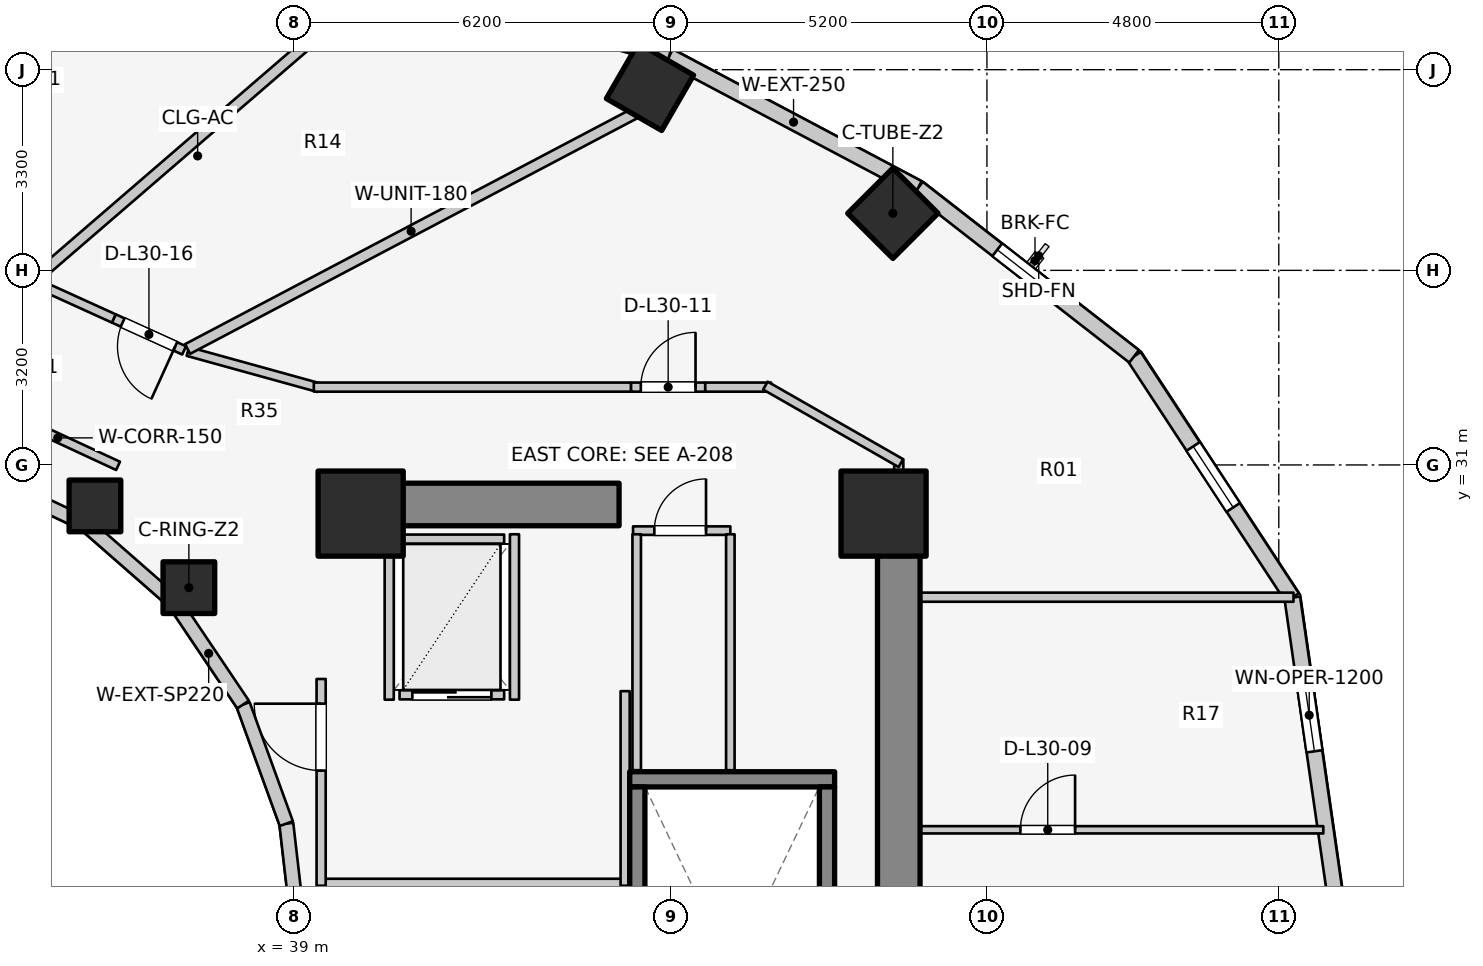
"""IFC4 building model, lengths in metres.
Left out: names, types, materials, properties, quantities, classifications, styles, units other than length and angle.
Written with IfcOpenShell. Run it as: python <this file> out.ifc"""

import sys

from ifc_helpers import new_model, si_unit, direction, frame, frame_2d, origin, origin_2d, place, context, subcontext, project, spatial, rectangle, extrude, element, fill, save


model = new_model("IFC4")
c1 = context("Model", 3, precision=1e-05, world=origin(), true_north=direction((0.0, 1.0)))
c2 = subcontext(c1, "Body", "Model", "MODEL_VIEW")
j1 = project(units=[si_unit("LENGTHUNIT", "METRE"), si_unit("PLANEANGLEUNIT", "RADIAN")], contexts=[c1])
p1 = place(None, origin())
s1 = spatial("IfcSite", under=j1, at=p1, CompositionType="ELEMENT")
p2 = place(p1, origin())
s2 = spatial("IfcBuilding", under=s1, at=p2, CompositionType="ELEMENT")
p3 = place(p2, frame((0.0, 0.0, 101.1)))
s3 = spatial("IfcBuildingStorey", under=s2, at=p3, CompositionType="ELEMENT", Elevation=101.1)
p4 = place(p3, frame((48.95, 17.05, 0.0), z_axis=(0.0, 0.0, 1.0), x_axis=(0.0, 1.0, 0.0)))
e1 = element("IfcWall", 1, at=p4, inside=s3, PredefinedType="SHEAR", context=c2, shape_type="SweptSolid", body=[
    extrude(rectangle(XDim=12.8, YDim=0.7, at=frame_2d((6.4, 0.0))), origin(), (0.0, 0.0, 1.0), 3.1),
])
p5 = place(p3, frame((39.85, 30.35, 0.0), z_axis=(0.0, 0.0, 1.0), x_axis=(1.0, 0.0, 0.0)))
e2 = element("IfcWall", 2, at=p5, inside=s3, PredefinedType="SHEAR", context=c2, shape_type="SweptSolid", body=[
    extrude(rectangle(XDim=4.5, YDim=0.7, at=frame_2d((2.25, 0.0))), origin(), (0.0, 0.0, 1.0), 3.1),
])
p6 = place(p3, frame((44.525, 25.83, 0.0), z_axis=(0.0, 0.0, 1.0), x_axis=(1.0, 0.0, 0.0)))
e3 = element("IfcWall", 3, at=p6, inside=s3, PredefinedType="SOLIDWALL", context=c2, shape_type="SweptSolid", body=[
    extrude(rectangle(XDim=3.37, YDim=0.25, at=frame_2d((1.685, 0.0))), origin(), (0.0, 0.0, 1.0), 3.1),
])
for number, where, z_axis, x_axis in (
    (4, (44.65, 17.895, 0.0), (0.0, 0.0, 1.0), (0.0, 1.0, 0.0)),
    (5, (47.77, 17.895, 0.0), (0.0, 0.0, 1.0), (0.0, 1.0, 0.0)),
):
    element("IfcWall", number, at=place(p3, frame(where, z_axis=z_axis, x_axis=x_axis)), inside=s3, PredefinedType="SOLIDWALL", context=c2, shape_type="SweptSolid", body=[
        extrude(rectangle(XDim=7.81, YDim=0.25, at=frame_2d((3.905, 0.0))), origin(), (0.0, 0.0, 1.0), 3.1),
    ])
for number, where, z_axis, x_axis in (
    (6, (48.7, 30.2, 0.0), (0.0, 0.0, 1.0), (1.0, 0.0, 0.0)),
    (7, (40.1, 30.2, 0.0), (0.0, 0.0, 1.0), (1.0, 0.0, 0.0)),
):
    element("IfcColumn", number, at=place(p3, frame(where, z_axis=z_axis, x_axis=x_axis)), inside=s3, PredefinedType="COLUMN", context=c2, shape_type="SweptSolid", body=[
        extrude(rectangle(XDim=1.4, YDim=1.4, at=origin_2d()), origin(), (0.0, 0.0, 1.0), 3.1),
    ])
p7 = place(p3, frame((37.275, 28.982, 0.0), z_axis=(0.0, 0.0, 1.0), x_axis=(1.0, 0.0, 0.0)))
e8 = element("IfcColumn", 8, at=p7, inside=s3, PredefinedType="COLUMN", context=c2, shape_type="SweptSolid", body=[
    extrude(rectangle(XDim=0.85, YDim=0.85, at=origin_2d()), origin(), (0.0, 0.0, 1.0), 3.1),
])
p8 = place(p3, frame((48.853, 35.138, 0.0), z_axis=(0.0, 0.0, 1.0), x_axis=(0.707106781187, 0.707106781187, 0.0)))
e9 = element("IfcColumn", 9, at=p8, inside=s3, PredefinedType="COLUMN", context=c2, shape_type="SweptSolid", body=[
    extrude(rectangle(XDim=1.05, YDim=1.05, at=origin_2d()), origin(), (0.0, 0.0, 1.0), 3.1),
])
p9 = place(p3, frame((35.73, 30.327, 0.0), z_axis=(0.0, 0.0, 1.0), x_axis=(1.0, 0.0, 0.0)))
e10 = element("IfcColumn", 10, at=p9, inside=s3, PredefinedType="COLUMN", context=c2, shape_type="SweptSolid", body=[
    extrude(rectangle(XDim=0.85, YDim=0.85, at=origin_2d()), origin(), (0.0, 0.0, 1.0), 3.1),
])
p10 = place(p3, frame((44.858, 37.218, 0.0), z_axis=(0.0, 0.0, 1.0), x_axis=(0.5, 0.866025403784, 0.0)))
e11 = element("IfcColumn", 11, at=p10, inside=s3, PredefinedType="COLUMN", context=c2, shape_type="SweptSolid", body=[
    extrude(rectangle(XDim=1.05, YDim=1.05, at=origin_2d()), origin(), (0.0, 0.0, 1.0), 3.1),
])
p11 = place(p3, frame((39.12, 23.0, 0.0), z_axis=(0.0, 0.0, 1.0), x_axis=(-0.114711713601, 0.993398823617, 0.0)))
e12 = element("IfcWall", 12, at=p11, inside=s3, PredefinedType="STANDARD", context=c2, shape_type="SweptSolid", body=[
    extrude(rectangle(XDim=2.115, YDim=0.23, at=frame_2d((1.058, 0.0))), origin(), (0.0, 0.0, 1.0), 2.56),
])
p12 = place(p3, frame((38.877, 25.102, 0.0), z_axis=(0.0, 0.0, 1.0), x_axis=(-0.341423187295, 0.93990968033, 0.0)))
e13 = element("IfcWall", 13, at=p12, inside=s3, PredefinedType="STANDARD", context=c2, shape_type="SweptSolid", body=[
    extrude(rectangle(XDim=2.084, YDim=0.23, at=frame_2d((1.042, 0.0))), origin(), (0.0, 0.0, 1.0), 2.56),
])
p13 = place(p3, frame((38.166, 27.06, 0.0), z_axis=(0.0, 0.0, 1.0), x_axis=(-0.558197800898, 0.829707909492, 0.0)))
e14 = element("IfcWall", 14, at=p13, inside=s3, PredefinedType="STANDARD", context=c2, shape_type="SweptSolid", body=[
    extrude(rectangle(XDim=2.027, YDim=0.23, at=frame_2d((1.013, 0.0))), origin(), (0.0, 0.0, 1.0), 1.22),
])
p14 = place(p3, frame((37.035, 28.742, 0.0), z_axis=(0.0, 0.0, 1.0), x_axis=(-0.752576694707, 0.658504607869, 0.0)))
e15 = element("IfcWall", 15, at=p14, inside=s3, PredefinedType="STANDARD", context=c2, shape_type="SweptSolid", body=[
    extrude(rectangle(XDim=1.959, YDim=0.23, at=frame_2d((0.98, 0.0))), origin(), (0.0, 0.0, 1.0), 1.22),
])
p15 = place(p3, frame((35.56, 30.032, 0.0), z_axis=(0.0, 0.0, 1.0), x_axis=(-0.904179699603, 0.427152280606, 0.0)))
e16 = element("IfcWall", 16, at=p15, inside=s3, PredefinedType="STANDARD", context=c2, shape_type="SweptSolid", body=[
    extrude(rectangle(XDim=1.899, YDim=0.23, at=frame_2d((0.95, 0.0))), origin(), (0.0, 0.0, 1.0), 1.22),
])
p16 = place(p3, frame((56.26, 23.0, 0.0), z_axis=(0.0, 0.0, 1.0), x_axis=(-0.142572472068, 0.98978436551, 0.0)))
e17 = element("IfcWall", 17, at=p16, inside=s3, PredefinedType="STANDARD", context=c2, shape_type="SweptSolid", body=[
    extrude(rectangle(XDim=5.879, YDim=0.26, at=frame_2d((2.939, 0.0))), origin(), (0.0, 0.0, 1.0), 2.57),
])
p17 = place(p16, frame((3.325, 0.0, 0.75)))
e18 = element("IfcOpeningElement", 18, at=p17, cuts=e17, PredefinedType="OPENING", context=c2, shape_type="SweptSolid", body=[
    extrude(rectangle(XDim=1.2, YDim=1.5, at=frame_2d((0.6, 0.75))), frame((0.0, 0.14, 0.0), z_axis=(0.0, -1.0, 0.0), x_axis=(1.0, 0.0, 0.0)), (0.0, 0.0, 1.0), 0.28),
])
p18 = place(p3, frame((55.422, 28.819, 0.0), z_axis=(0.0, 0.0, 1.0), x_axis=(-0.548283220945, 0.836292717672, 0.0)))
e19 = element("IfcWall", 19, at=p18, inside=s3, PredefinedType="STANDARD", context=c2, shape_type="SweptSolid", body=[
    extrude(rectangle(XDim=4.744, YDim=0.26, at=frame_2d((2.372, 0.0))), origin(), (0.0, 0.0, 1.0), 1.22),
])
p19 = place(p18, frame((1.772, 0.0, 0.15)))
e20 = element("IfcOpeningElement", 20, at=p19, cuts=e19, PredefinedType="OPENING", context=c2, shape_type="SweptSolid", body=[
    extrude(rectangle(XDim=1.2, YDim=0.9, at=frame_2d((0.6, 0.45))), frame((0.0, 0.14, 0.0), z_axis=(0.0, -1.0, 0.0), x_axis=(1.0, 0.0, 0.0)), (0.0, 0.0, 1.0), 0.28),
])
p20 = place(p3, frame((52.821, 32.786, 0.0), z_axis=(0.0, 0.0, 1.0), x_axis=(-0.789127449954, 0.614229491094, 0.0)))
e21 = element("IfcWall", 21, at=p20, inside=s3, PredefinedType="STANDARD", context=c2, shape_type="SweptSolid", body=[
    extrude(rectangle(XDim=4.505, YDim=0.26, at=frame_2d((2.252, 0.0))), origin(), (0.0, 0.0, 1.0), 1.22),
])
p21 = place(p20, frame((1.652, 0.0, 0.15)))
e22 = element("IfcOpeningElement", 22, at=p21, cuts=e21, PredefinedType="OPENING", context=c2, shape_type="SweptSolid", body=[
    extrude(rectangle(XDim=1.2, YDim=0.9, at=frame_2d((0.6, 0.45))), frame((0.0, 0.14, 0.0), z_axis=(0.0, -1.0, 0.0), x_axis=(1.0, 0.0, 0.0)), (0.0, 0.0, 1.0), 0.28),
])
p22 = place(p3, frame((49.266, 35.553, 0.0), z_axis=(0.0, 0.0, 1.0), x_axis=(-0.883668636807, 0.4681129568, 0.0)))
e23 = element("IfcWall", 23, at=p22, inside=s3, PredefinedType="STANDARD", context=c2, shape_type="SweptSolid", body=[
    extrude(rectangle(XDim=4.631, YDim=0.26, at=frame_2d((2.316, 0.0))), origin(), (0.0, 0.0, 1.0), 1.22),
])
p23 = place(p3, frame((45.173, 37.721, 0.0), z_axis=(0.0, 0.0, 1.0), x_axis=(-0.962938491413, 0.269721081407, 0.0)))
e24 = element("IfcWall", 24, at=p23, inside=s3, PredefinedType="STANDARD", context=c2, shape_type="SweptSolid", body=[
    extrude(rectangle(XDim=5.563, YDim=0.26, at=frame_2d((2.782, 0.0))), origin(), (0.0, 0.0, 1.0), 1.22),
])
p24 = place(p23, frame((2.182, 0.0, 0.15)))
e25 = element("IfcOpeningElement", 25, at=p24, cuts=e24, PredefinedType="OPENING", context=c2, shape_type="SweptSolid", body=[
    extrude(rectangle(XDim=1.2, YDim=0.9, at=frame_2d((0.6, 0.45))), frame((0.0, 0.14, 0.0), z_axis=(0.0, -1.0, 0.0), x_axis=(1.0, 0.0, 0.0)), (0.0, 0.0, 1.0), 0.28),
])
p25 = place(p3, frame((40.74, 27.22, 0.0), z_axis=(0.0, 0.0, 1.0), x_axis=(1.0, 0.0, 0.0)))
e26 = element("IfcWall", 26, at=p25, inside=s3, PredefinedType="SOLIDWALL", context=c2, shape_type="SweptSolid", body=[
    extrude(rectangle(XDim=1.72, YDim=0.15, at=frame_2d((0.86, 0.0))), origin(), (0.0, 0.0, 1.0), 2.575),
])
p26 = place(p25, frame((0.21, 0.0, 0.0)))
e27 = element("IfcOpeningElement", 27, at=p26, cuts=e26, PredefinedType="OPENING", context=c2, shape_type="SweptSolid", body=[
    extrude(rectangle(XDim=1.3, YDim=2.1, at=frame_2d((0.65, 1.05))), frame((0.0, 0.085, 0.0), z_axis=(0.0, -1.0, 0.0), x_axis=(1.0, 0.0, 0.0)), (0.0, 0.0, 1.0), 0.17),
])
p27 = place(p3, frame((40.74, 29.78, 0.0), z_axis=(0.0, 0.0, 1.0), x_axis=(1.0, 0.0, 0.0)))
e28 = element("IfcWall", 28, at=p27, inside=s3, PredefinedType="SOLIDWALL", context=c2, shape_type="SweptSolid", body=[
    extrude(rectangle(XDim=1.72, YDim=0.15, at=frame_2d((0.86, 0.0))), origin(), (0.0, 0.0, 1.0), 2.575),
])
for number, where, z_axis, x_axis in (
    (29, (40.57, 27.14, 0.0), (0.0, 0.0, 1.0), (0.0, 1.0, 0.0)),
    (30, (42.63, 27.14, 0.0), (0.0, 0.0, 1.0), (0.0, 1.0, 0.0)),
):
    element("IfcWall", number, at=place(p3, frame(where, z_axis=z_axis, x_axis=x_axis)), inside=s3, PredefinedType="SOLIDWALL", context=c2, shape_type="SweptSolid", body=[
        extrude(rectangle(XDim=2.72, YDim=0.15, at=frame_2d((1.36, 0.0))), origin(), (0.0, 0.0, 1.0), 2.575),
    ])
p28 = place(p3, frame((39.4, 24.12, 0.0), z_axis=(0.0, 0.0, 1.0), x_axis=(1.0, 0.0, 0.0)))
e31 = element("IfcWall", 31, at=p28, inside=s3, PredefinedType="PARTITIONING", context=c2, shape_type="SweptSolid", body=[
    extrude(rectangle(XDim=5.08, YDim=0.15, at=frame_2d((2.54, 0.0))), origin(), (0.0, 0.0, 1.0), 2.12),
])
p29 = place(p3, frame((44.45, 24.08, 0.0), z_axis=(0.0, 0.0, 1.0), x_axis=(0.0, 1.0, 0.0)))
e32 = element("IfcWall", 32, at=p29, inside=s3, PredefinedType="PARTITIONING", context=c2, shape_type="SweptSolid", body=[
    extrude(rectangle(XDim=3.2, YDim=0.15, at=frame_2d((1.6, 0.0))), origin(), (0.0, 0.0, 1.0), 2.575),
])
p30 = place(p3, frame((39.45, 24.08, 0.0), z_axis=(0.0, 0.0, 1.0), x_axis=(0.0, 1.0, 0.0)))
e33 = element("IfcWall", 33, at=p30, inside=s3, PredefinedType="PARTITIONING", context=c2, shape_type="SweptSolid", body=[
    extrude(rectangle(XDim=3.4, YDim=0.15, at=frame_2d((1.7, 0.0))), origin(), (0.0, 0.0, 1.0), 2.575),
])
p31 = place(p30, frame((1.894, 0.0, 0.0)))
e34 = element("IfcOpeningElement", 34, at=p31, cuts=e33, PredefinedType="OPENING", context=c2, shape_type="SweptSolid", body=[
    extrude(rectangle(XDim=1.1, YDim=2.1, at=frame_2d((0.55, 1.05))), frame((0.0, 0.085, 0.0), z_axis=(0.0, -1.0, 0.0), x_axis=(1.0, 0.0, 0.0)), (0.0, 0.0, 1.0), 0.17),
])
p32 = place(p3, frame((44.58, 29.92, 0.0), z_axis=(0.0, 0.0, 1.0), x_axis=(1.0, 0.0, 0.0)))
e35 = element("IfcWall", 35, at=p32, inside=s3, PredefinedType="PLUMBINGWALL", context=c2, shape_type="SweptSolid", body=[
    extrude(rectangle(XDim=1.6, YDim=0.14, at=frame_2d((0.8, 0.0))), origin(), (0.0, 0.0, 1.0), 2.575),
])
p33 = place(p32, frame((0.35, 0.0, 0.0)))
e36 = element("IfcOpeningElement", 36, at=p33, cuts=e35, PredefinedType="OPENING", context=c2, shape_type="SweptSolid", body=[
    extrude(rectangle(XDim=0.85, YDim=2.05, at=frame_2d((0.425, 1.025))), frame((0.0, 0.08, 0.0), z_axis=(0.0, -1.0, 0.0), x_axis=(1.0, 0.0, 0.0)), (0.0, 0.0, 1.0), 0.16),
])
for number, where, z_axis, x_axis in (
    (37, (44.64, 25.98, 0.0), (0.0, 0.0, 1.0), (0.0, 1.0, 0.0)),
    (38, (46.18, 25.98, 0.0), (0.0, 0.0, 1.0), (0.0, 1.0, 0.0)),
):
    element("IfcWall", number, at=place(p3, frame(where, z_axis=z_axis, x_axis=x_axis)), inside=s3, PredefinedType="PLUMBINGWALL", context=c2, shape_type="SweptSolid", body=[
        extrude(rectangle(XDim=3.88, YDim=0.14, at=frame_2d((1.94, 0.0))), origin(), (0.0, 0.0, 1.0), 2.575),
    ])
p34 = place(p3, frame((36.11, 30.985, 0.0), z_axis=(0.0, 0.0, 1.0), x_axis=(-0.906943449489, 0.421252393975, 0.0)))
e39 = element("IfcWall", 39, at=p34, inside=s3, PredefinedType="PARTITIONING", context=c2, shape_type="SweptSolid", body=[
    extrude(rectangle(XDim=2.186, YDim=0.15, at=frame_2d((1.093, 0.0))), origin(), (0.0, 0.0, 1.0), 1.22),
])
p35 = place(p3, frame((48.95, 28.825, 0.0), z_axis=(0.0, 0.0, 1.0), x_axis=(1.0, 0.0, 0.0)))
e40 = element("IfcWall", 40, at=p35, inside=s3, PredefinedType="PARTITIONING", context=c2, shape_type="SweptSolid", body=[
    extrude(rectangle(XDim=6.492, YDim=0.15, at=frame_2d((3.246, 0.0))), origin(), (0.0, 0.0, 1.0), 2.575),
])
p36 = place(p3, frame((48.95, 25.0, 0.0), z_axis=(0.0, 0.0, 1.0), x_axis=(1.0, 0.0, 0.0)))
e41 = element("IfcWall", 41, at=p36, inside=s3, PredefinedType="MOVABLE", context=c2, shape_type="SweptSolid", body=[
    extrude(rectangle(XDim=6.982, YDim=0.12, at=frame_2d((3.491, 0.0))), origin(), (0.0, 0.0, 1.0), 2.575),
])
p37 = place(p36, frame((2.0, 0.0, 0.0)))
e42 = element("IfcOpeningElement", 42, at=p37, cuts=e41, PredefinedType="OPENING", context=c2, shape_type="SweptSolid", body=[
    extrude(rectangle(XDim=0.9, YDim=2.1, at=frame_2d((0.45, 1.05))), frame((0.0, 0.07, 0.0), z_axis=(0.0, -1.0, 0.0), x_axis=(1.0, 0.0, 0.0)), (0.0, 0.0, 1.0), 0.14),
])
p38 = place(p3, frame((48.95, 29.8, 0.0), z_axis=(0.0, 0.0, 1.0), x_axis=(0.0, 1.0, 0.0)))
e43 = element("IfcWall", 43, at=p38, inside=s3, PredefinedType="PARTITIONING", context=c2, shape_type="SweptSolid", body=[
    extrude(rectangle(XDim=1.29, YDim=0.15, at=frame_2d((0.645, 0.0))), origin(), (0.0, 0.0, 1.0), 1.22),
])
p39 = place(p3, frame((37.258, 32.867, 0.0), z_axis=(0.0, 0.0, 1.0), x_axis=(0.963833843713, -0.266503886865, 0.0)))
e44 = element("IfcWall", 44, at=p39, inside=s3, PredefinedType="PARTITIONING", context=c2, shape_type="SweptSolid", body=[
    extrude(rectangle(XDim=2.232, YDim=0.15, at=frame_2d((1.116, 0.0))), origin(), (0.0, 0.0, 1.0), 1.22),
])
p40 = place(p3, frame((39.33, 32.28, 0.0), z_axis=(0.0, 0.0, 1.0), x_axis=(1.0, 0.0, 0.0)))
e45 = element("IfcWall", 45, at=p40, inside=s3, PredefinedType="PARTITIONING", context=c2, shape_type="SweptSolid", body=[
    extrude(rectangle(XDim=5.218, YDim=0.15, at=frame_2d((2.609, 0.0))), origin(), (0.0, 0.0, 1.0), 1.22),
])
p41 = place(p3, frame((44.548, 32.28, 0.0), z_axis=(0.0, 0.0, 1.0), x_axis=(1.0, 0.0, 0.0)))
e46 = element("IfcWall", 46, at=p41, inside=s3, PredefinedType="PARTITIONING", context=c2, shape_type="SweptSolid", body=[
    extrude(rectangle(XDim=1.22, YDim=0.15, at=frame_2d((0.61, 0.0))), origin(), (0.0, 0.0, 1.0), 2.16),
])
p42 = place(p41, frame((0.16, 0.0, 0.0)))
e47 = element("IfcOpeningElement", 47, at=p42, cuts=e46, PredefinedType="OPENING", context=c2, shape_type="SweptSolid", body=[
    extrude(rectangle(XDim=0.9, YDim=2.1, at=frame_2d((0.45, 1.05))), frame((0.0, 0.085, 0.0), z_axis=(0.0, -1.0, 0.0), x_axis=(1.0, 0.0, 0.0)), (0.0, 0.0, 1.0), 0.17),
])
p43 = place(p3, frame((45.768, 32.28, 0.0), z_axis=(0.0, 0.0, 1.0), x_axis=(1.0, 0.0, 0.0)))
e48 = element("IfcWall", 48, at=p43, inside=s3, PredefinedType="PARTITIONING", context=c2, shape_type="SweptSolid", body=[
    extrude(rectangle(XDim=1.083, YDim=0.15, at=frame_2d((0.541, 0.0))), origin(), (0.0, 0.0, 1.0), 2.575),
])
p44 = place(p3, frame((46.757, 32.305, 0.0), z_axis=(0.0, 0.0, 1.0), x_axis=(0.867991349648, -0.496579315857, 0.0)))
e49 = element("IfcWall", 49, at=p44, inside=s3, PredefinedType="PARTITIONING", context=c2, shape_type="SweptSolid", body=[
    extrude(rectangle(XDim=2.567, YDim=0.15, at=frame_2d((1.283, 0.0))), origin(), (0.0, 0.0, 1.0), 1.22),
])
p45 = place(p3, frame((37.254, 32.907, 0.0), z_axis=(0.0, 0.0, 1.0), x_axis=(0.884730147854, 0.466103599512, 0.0)))
e50 = element("IfcWall", 50, at=p45, inside=s3, PredefinedType="PARTITIONING", context=c2, shape_type="SweptSolid", body=[
    extrude(rectangle(XDim=8.31, YDim=0.18, at=frame_2d((4.155, 0.0))), origin(), (0.0, 0.0, 1.0), 1.22),
])
p46 = place(p3, frame((34.736, 34.057, 0.0), z_axis=(0.0, 0.0, 1.0), x_axis=(0.757299396002, 0.65306785621, 0.0)))
e51 = element("IfcWall", 51, at=p46, inside=s3, PredefinedType="PARTITIONING", context=c2, shape_type="SweptSolid", body=[
    extrude(rectangle(XDim=6.289, YDim=0.18, at=frame_2d((3.145, 0.0))), origin(), (0.0, 0.0, 1.0), 1.22),
])
p47 = place(p3, frame((37.196, 32.884, 0.0), z_axis=(0.0, 0.0, 1.0), x_axis=(-0.910596749825, 0.413295970472, 0.0)))
e52 = element("IfcWall", 52, at=p47, inside=s3, PredefinedType="PARTITIONING", context=c2, shape_type="SweptSolid", body=[
    extrude(rectangle(XDim=1.27, YDim=0.15, at=frame_2d((0.635, 0.0))), origin(), (0.0, 0.0, 1.0), 2.16),
])
p48 = place(p47, frame((0.16, 0.0, 0.0)))
e53 = element("IfcOpeningElement", 53, at=p48, cuts=e52, PredefinedType="OPENING", context=c2, shape_type="SweptSolid", body=[
    extrude(rectangle(XDim=0.95, YDim=2.1, at=frame_2d((0.475, 1.05))), frame((0.0, 0.085, 0.0), z_axis=(0.0, -1.0, 0.0), x_axis=(1.0, 0.0, 0.0)), (0.0, 0.0, 1.0), 0.17),
])
p49 = place(p3, frame((36.04, 33.409, 0.0), z_axis=(0.0, 0.0, 1.0), x_axis=(-0.910563383081, 0.41336947806, 0.0)))
e54 = element("IfcWall", 54, at=p49, inside=s3, PredefinedType="PARTITIONING", context=c2, shape_type="SweptSolid", body=[
    extrude(rectangle(XDim=1.485, YDim=0.15, at=frame_2d((0.743, 0.0))), origin(), (0.0, 0.0, 1.0), 1.22),
])
p50 = place(p17, origin())
e55 = element("IfcWindow", 55, at=p50, inside=s3, PartitioningType="SINGLE_PANEL", PredefinedType="WINDOW", context=c2, shape_type="SweptSolid", body=[
    extrude(rectangle(XDim=1.2, YDim=1.5, at=frame_2d((0.6, 0.75))), frame((0.0, 0.03, 0.0), z_axis=(0.0, -1.0, 0.0), x_axis=(1.0, 0.0, 0.0)), (0.0, 0.0, 1.0), 0.06),
])
fill(e18, e55)
p51 = place(p19, origin())
e56 = element("IfcWindow", 56, at=p51, inside=s3, PartitioningType="SINGLE_PANEL", PredefinedType="WINDOW", context=c2, shape_type="SweptSolid", body=[
    extrude(rectangle(XDim=1.2, YDim=0.9, at=frame_2d((0.6, 0.45))), frame((0.0, 0.03, 0.0), z_axis=(0.0, -1.0, 0.0), x_axis=(1.0, 0.0, 0.0)), (0.0, 0.0, 1.0), 0.06),
])
fill(e20, e56)
p52 = place(p21, origin())
e57 = element("IfcWindow", 57, at=p52, inside=s3, PartitioningType="SINGLE_PANEL", PredefinedType="WINDOW", context=c2, shape_type="SweptSolid", body=[
    extrude(rectangle(XDim=1.2, YDim=0.9, at=frame_2d((0.6, 0.45))), frame((0.0, 0.03, 0.0), z_axis=(0.0, -1.0, 0.0), x_axis=(1.0, 0.0, 0.0)), (0.0, 0.0, 1.0), 0.06),
])
fill(e22, e57)
p53 = place(p26, origin())
e58 = element("IfcDoor", 58, at=p53, inside=s3, OperationType="DOUBLE_DOOR_SLIDING", PredefinedType="DOOR", context=c2, shape_type="SweptSolid", body=[
    extrude(rectangle(XDim=1.3, YDim=2.1, at=frame_2d((0.65, 1.05))), frame((0.0, 0.025, 0.0), z_axis=(0.0, -1.0, 0.0), x_axis=(1.0, 0.0, 0.0)), (0.0, 0.0, 1.0), 0.05),
])
fill(e27, e58)
p54 = place(p31, origin())
e59 = element("IfcDoor", 59, at=p54, inside=s3, OperationType="SINGLE_SWING_RIGHT", PredefinedType="DOOR", context=c2, shape_type="SweptSolid", body=[
    extrude(rectangle(XDim=1.1, YDim=2.1, at=frame_2d((0.55, 1.05))), frame((0.0, 0.025, 0.0), z_axis=(0.0, -1.0, 0.0), x_axis=(1.0, 0.0, 0.0)), (0.0, 0.0, 1.0), 0.05),
])
fill(e34, e59)
p55 = place(p33, origin())
e60 = element("IfcDoor", 60, at=p55, inside=s3, OperationType="SINGLE_SWING_RIGHT", PredefinedType="DOOR", context=c2, shape_type="SweptSolid", body=[
    extrude(rectangle(XDim=0.85, YDim=2.05, at=frame_2d((0.425, 1.025))), frame((0.0, 0.025, 0.0), z_axis=(0.0, -1.0, 0.0), x_axis=(1.0, 0.0, 0.0)), (0.0, 0.0, 1.0), 0.05),
])
fill(e36, e60)
p56 = place(p37, origin())
e61 = element("IfcDoor", 61, at=p56, inside=s3, OperationType="SINGLE_SWING_RIGHT", PredefinedType="DOOR", context=c2, shape_type="SweptSolid", body=[
    extrude(rectangle(XDim=0.9, YDim=2.1, at=frame_2d((0.45, 1.05))), frame((0.0, 0.025, 0.0), z_axis=(0.0, -1.0, 0.0), x_axis=(1.0, 0.0, 0.0)), (0.0, 0.0, 1.0), 0.05),
])
fill(e42, e61)
p57 = place(p42, origin())
e62 = element("IfcDoor", 62, at=p57, inside=s3, OperationType="SINGLE_SWING_RIGHT", PredefinedType="DOOR", context=c2, shape_type="SweptSolid", body=[
    extrude(rectangle(XDim=0.9, YDim=2.1, at=frame_2d((0.45, 1.05))), frame((0.0, 0.025, 0.0), z_axis=(0.0, -1.0, 0.0), x_axis=(1.0, 0.0, 0.0)), (0.0, 0.0, 1.0), 0.05),
])
fill(e47, e62)
p58 = place(p48, origin())
e63 = element("IfcDoor", 63, at=p58, inside=s3, OperationType="SINGLE_SWING_LEFT", PredefinedType="DOOR", context=c2, shape_type="SweptSolid", body=[
    extrude(rectangle(XDim=0.95, YDim=2.1, at=frame_2d((0.475, 1.05))), frame((0.0, 0.025, 0.0), z_axis=(0.0, -1.0, 0.0), x_axis=(1.0, 0.0, 0.0)), (0.0, 0.0, 1.0), 0.05),
])
fill(e53, e63)
save(model, sys.argv[1])
